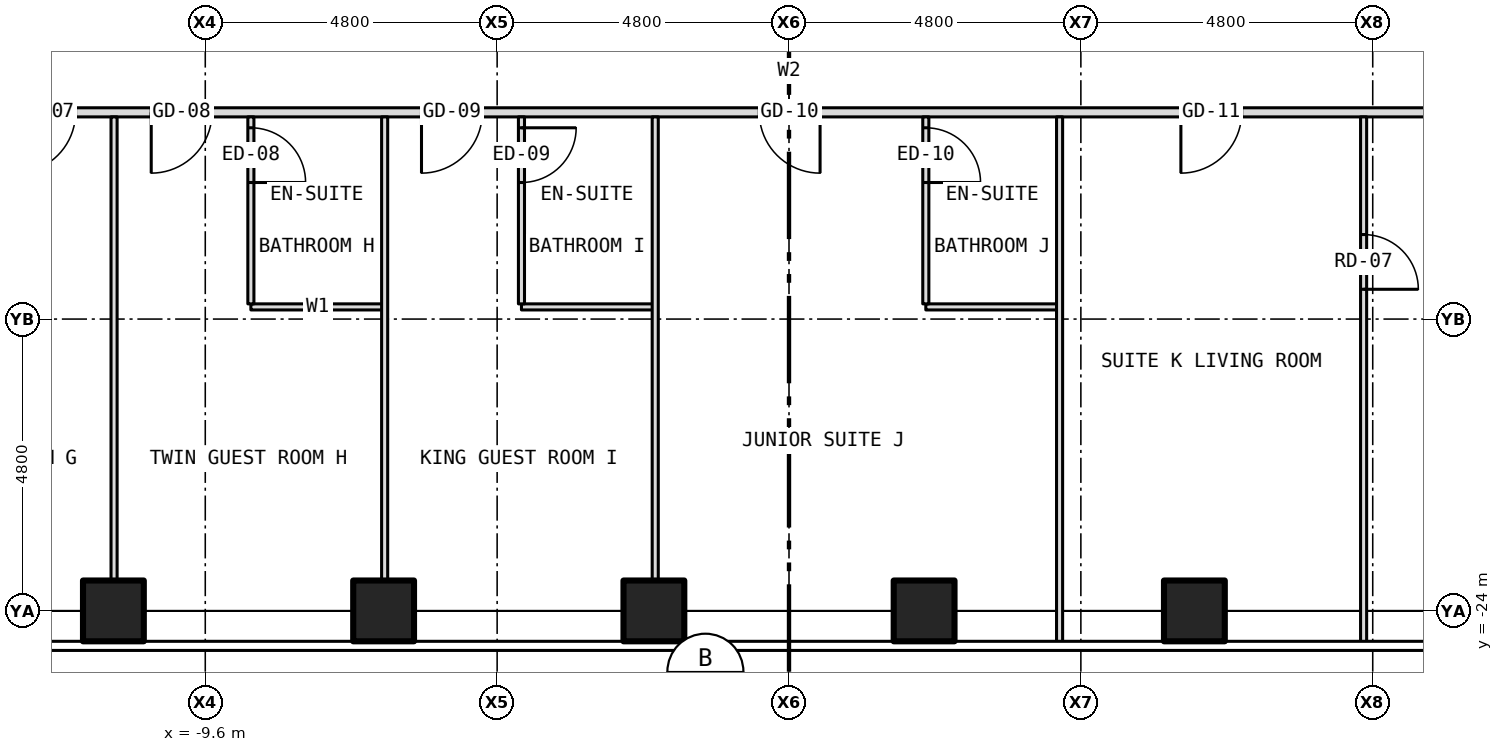
"""IFC4 building model, lengths in metres.
Left out: names, types, materials, properties, quantities, classifications, styles, units other than length and angle.
Written with IfcOpenShell. Run it as: python <this file> out.ifc"""

import sys

from ifc_helpers import new_model, si_unit, direction, frame, frame_2d, origin, origin_2d, place, context, subcontext, project, spatial, rectangle, hollow_rectangle, extrude, element, fill, save


model = new_model("IFC4")
c1 = context("Model", 3, precision=1e-05, world=origin(), true_north=direction((0.0, 1.0)))
c2 = subcontext(c1, "Body", "Model", "MODEL_VIEW")
j1 = project(units=[si_unit("LENGTHUNIT", "METRE"), si_unit("PLANEANGLEUNIT", "RADIAN")], contexts=[c1])
p1 = place(None, origin())
s1 = spatial("IfcSite", under=j1, at=p1, CompositionType="ELEMENT")
p2 = place(p1, origin())
s2 = spatial("IfcBuilding", under=s1, at=p2, CompositionType="ELEMENT")
p3 = place(p2, frame((0.0, 0.0, 56.5)))
s3 = spatial("IfcBuildingStorey", under=s2, at=p3, CompositionType="ELEMENT", Elevation=56.5)
for number, where, z_axis, x_axis in (
    (1, (-11.111, -24.0, -0.15), (0.0, 0.0, 1.0), (1.0, 0.0, 0.0)),
    (2, (-6.667, -24.0, -0.15), (0.0, 0.0, 1.0), (1.0, 0.0, 0.0)),
    (3, (-2.222, -24.0, -0.15), (0.0, 0.0, 1.0), (1.0, 0.0, 0.0)),
    (4, (2.222, -24.0, -0.15), (0.0, 0.0, 1.0), (1.0, 0.0, 0.0)),
    (5, (6.667, -24.0, -0.15), (0.0, 0.0, 1.0), (1.0, 0.0, 0.0)),
):
    element("IfcColumn", number, at=place(p3, frame(where, z_axis=z_axis, x_axis=x_axis)), inside=s3, PredefinedType="COLUMN", context=c2, shape_type="SweptSolid", body=[
        extrude(hollow_rectangle(XDim=1.0, YDim=1.0, WallThickness=0.06, at=origin_2d()), origin(), (0.0, 0.0, 1.0), 3.5),
    ])
p4 = place(p3, frame((-8.85, -19.0, 0.0), z_axis=(0.0, 0.0, 1.0), x_axis=(1.0, 0.0, 0.0)))
e6 = element("IfcWall", 6, at=p4, inside=s3, PredefinedType="PARTITIONING", context=c2, shape_type="SweptSolid", body=[
    extrude(rectangle(XDim=2.2, YDim=0.1, at=frame_2d((1.1, 0.0))), origin(), (0.0, 0.0, 1.0), 3.35),
])
for number, where, z_axis, x_axis in (
    (7, (-4.4, -19.0, 0.0), (0.0, 0.0, 1.0), (1.0, 0.0, 0.0)),
    (8, (2.25, -19.0, 0.0), (0.0, 0.0, 1.0), (1.0, 0.0, 0.0)),
):
    element("IfcWall", number, at=place(p3, frame(where, z_axis=z_axis, x_axis=x_axis)), inside=s3, PredefinedType="PARTITIONING", context=c2, shape_type="SweptSolid", body=[
        extrude(rectangle(XDim=2.2, YDim=0.1, at=frame_2d((1.1, 0.0))), origin(), (0.0, 0.0, 1.0), 3.35),
    ])
p5 = place(p3, frame((-15.8, -15.8, 0.0), z_axis=(0.0, 0.0, 1.0), x_axis=(1.0, 0.0, 0.0)))
e9 = element("IfcWall", 9, at=p5, inside=s3, PredefinedType="PARTITIONING", context=c2, shape_type="SweptSolid", body=[
    extrude(rectangle(XDim=31.6, YDim=0.15, at=frame_2d((15.8, 0.0))), origin(), (0.0, 0.0, 1.0), 3.35),
])
p6 = place(p5, frame((3.067, 0.0, 0.0)))
e10 = element("IfcOpeningElement", 10, at=p6, cuts=e9, PredefinedType="OPENING", context=c2, shape_type="SweptSolid", body=[
    extrude(rectangle(XDim=1.0, YDim=2.1, at=frame_2d((0.5, 1.05))), frame((0.0, 0.087, 0.0), z_axis=(0.0, -1.0, 0.0), x_axis=(1.0, 0.0, 0.0)), (0.0, 0.0, 1.0), 0.174),
])
p7 = place(p5, frame((5.311, 0.0, 0.0)))
e11 = element("IfcOpeningElement", 11, at=p7, cuts=e9, PredefinedType="OPENING", context=c2, shape_type="SweptSolid", body=[
    extrude(rectangle(XDim=1.0, YDim=2.1, at=frame_2d((0.5, 1.05))), frame((0.0, 0.087, 0.0), z_axis=(0.0, -1.0, 0.0), x_axis=(1.0, 0.0, 0.0)), (0.0, 0.0, 1.0), 0.174),
])
p8 = place(p5, frame((9.756, 0.0, 0.0)))
e12 = element("IfcOpeningElement", 12, at=p8, cuts=e9, PredefinedType="OPENING", context=c2, shape_type="SweptSolid", body=[
    extrude(rectangle(XDim=1.0, YDim=2.1, at=frame_2d((0.5, 1.05))), frame((0.0, 0.087, 0.0), z_axis=(0.0, -1.0, 0.0), x_axis=(1.0, 0.0, 0.0)), (0.0, 0.0, 1.0), 0.174),
])
p9 = place(p5, frame((15.311, 0.0, 0.0)))
e13 = element("IfcOpeningElement", 13, at=p9, cuts=e9, PredefinedType="OPENING", context=c2, shape_type="SweptSolid", body=[
    extrude(rectangle(XDim=1.0, YDim=2.1, at=frame_2d((0.5, 1.05))), frame((0.0, 0.087, 0.0), z_axis=(0.0, -1.0, 0.0), x_axis=(1.0, 0.0, 0.0)), (0.0, 0.0, 1.0), 0.174),
])
p10 = place(p5, frame((22.245, 0.0, 0.0)))
e14 = element("IfcOpeningElement", 14, at=p10, cuts=e9, PredefinedType="OPENING", context=c2, shape_type="SweptSolid", body=[
    extrude(rectangle(XDim=1.0, YDim=2.1, at=frame_2d((0.5, 1.05))), frame((0.0, 0.087, 0.0), z_axis=(0.0, -1.0, 0.0), x_axis=(1.0, 0.0, 0.0)), (0.0, 0.0, 1.0), 0.174),
])
p11 = place(p3, frame((-11.1, -23.88, 0.0), z_axis=(0.0, 0.0, 1.0), x_axis=(0.0, 1.0, 0.0)))
e15 = element("IfcWall", 15, at=p11, inside=s3, PredefinedType="PARTITIONING", context=c2, shape_type="SweptSolid", body=[
    extrude(rectangle(XDim=8.005, YDim=0.1, at=frame_2d((4.002, 0.0))), origin(), (0.0, 0.0, 1.0), 3.35),
])
p12 = place(p3, frame((-8.85, -18.95, 0.0), z_axis=(0.0, 0.0, 1.0), x_axis=(0.0, 1.0, 0.0)))
e16 = element("IfcWall", 16, at=p12, inside=s3, PredefinedType="PARTITIONING", context=c2, shape_type="SweptSolid", body=[
    extrude(rectangle(XDim=3.075, YDim=0.1, at=frame_2d((1.538, 0.0))), origin(), (0.0, 0.0, 1.0), 3.35),
])
p13 = place(p12, frame((1.996, 0.0, 0.0)))
e17 = element("IfcOpeningElement", 17, at=p13, cuts=e16, PredefinedType="OPENING", context=c2, shape_type="SweptSolid", body=[
    extrude(rectangle(XDim=0.9, YDim=2.1, at=frame_2d((0.45, 1.05))), frame((0.0, 0.062, 0.0), z_axis=(0.0, -1.0, 0.0), x_axis=(1.0, 0.0, 0.0)), (0.0, 0.0, 1.0), 0.124),
])
p14 = place(p3, frame((-6.65, -23.88, 0.0), z_axis=(0.0, 0.0, 1.0), x_axis=(0.0, 1.0, 0.0)))
e18 = element("IfcWall", 18, at=p14, inside=s3, PredefinedType="PARTITIONING", context=c2, shape_type="SweptSolid", body=[
    extrude(rectangle(XDim=8.005, YDim=0.1, at=frame_2d((4.002, 0.0))), origin(), (0.0, 0.0, 1.0), 3.35),
])
p15 = place(p3, frame((-4.4, -18.95, 0.0), z_axis=(0.0, 0.0, 1.0), x_axis=(0.0, 1.0, 0.0)))
e19 = element("IfcWall", 19, at=p15, inside=s3, PredefinedType="PARTITIONING", context=c2, shape_type="SweptSolid", body=[
    extrude(rectangle(XDim=3.075, YDim=0.1, at=frame_2d((1.538, 0.0))), origin(), (0.0, 0.0, 1.0), 3.35),
])
p16 = place(p15, frame((1.996, 0.0, 0.0)))
e20 = element("IfcOpeningElement", 20, at=p16, cuts=e19, PredefinedType="OPENING", context=c2, shape_type="SweptSolid", body=[
    extrude(rectangle(XDim=0.9, YDim=2.1, at=frame_2d((0.45, 1.05))), frame((0.0, 0.062, 0.0), z_axis=(0.0, -1.0, 0.0), x_axis=(1.0, 0.0, 0.0)), (0.0, 0.0, 1.0), 0.124),
])
p17 = place(p3, frame((-2.2, -23.88, 0.0), z_axis=(0.0, 0.0, 1.0), x_axis=(0.0, 1.0, 0.0)))
e21 = element("IfcWall", 21, at=p17, inside=s3, PredefinedType="PARTITIONING", context=c2, shape_type="SweptSolid", body=[
    extrude(rectangle(XDim=8.005, YDim=0.1, at=frame_2d((4.002, 0.0))), origin(), (0.0, 0.0, 1.0), 3.35),
])
p18 = place(p3, frame((2.25, -18.95, 0.0), z_axis=(0.0, 0.0, 1.0), x_axis=(0.0, 1.0, 0.0)))
e22 = element("IfcWall", 22, at=p18, inside=s3, PredefinedType="PARTITIONING", context=c2, shape_type="SweptSolid", body=[
    extrude(rectangle(XDim=3.075, YDim=0.1, at=frame_2d((1.538, 0.0))), origin(), (0.0, 0.0, 1.0), 3.35),
])
p19 = place(p18, frame((1.996, 0.0, 0.0)))
e23 = element("IfcOpeningElement", 23, at=p19, cuts=e22, PredefinedType="OPENING", context=c2, shape_type="SweptSolid", body=[
    extrude(rectangle(XDim=0.9, YDim=2.1, at=frame_2d((0.45, 1.05))), frame((0.0, 0.062, 0.0), z_axis=(0.0, -1.0, 0.0), x_axis=(1.0, 0.0, 0.0)), (0.0, 0.0, 1.0), 0.124),
])
p20 = place(p3, frame((4.45, -24.53, 0.0), z_axis=(0.0, 0.0, 1.0), x_axis=(0.0, 1.0, 0.0)))
e24 = element("IfcWall", 24, at=p20, inside=s3, PredefinedType="PARTITIONING", context=c2, shape_type="SweptSolid", body=[
    extrude(rectangle(XDim=8.655, YDim=0.1, at=frame_2d((4.328, 0.0))), origin(), (0.0, 0.0, 1.0), 3.35),
])
p21 = place(p3, frame((9.45, -24.53, 0.0), z_axis=(0.0, 0.0, 1.0), x_axis=(0.0, 1.0, 0.0)))
e25 = element("IfcWall", 25, at=p21, inside=s3, PredefinedType="PARTITIONING", context=c2, shape_type="SweptSolid", body=[
    extrude(rectangle(XDim=8.655, YDim=0.1, at=frame_2d((4.328, 0.0))), origin(), (0.0, 0.0, 1.0), 2.728),
])
p22 = place(p21, frame((5.82, 0.0, 0.0)))
e26 = element("IfcOpeningElement", 26, at=p22, cuts=e25, PredefinedType="OPENING", context=c2, shape_type="SweptSolid", body=[
    extrude(rectangle(XDim=0.9, YDim=2.1, at=frame_2d((0.45, 1.05))), frame((0.0, 0.062, 0.0), z_axis=(0.0, -1.0, 0.0), x_axis=(1.0, 0.0, 0.0)), (0.0, 0.0, 1.0), 0.124),
])
p23 = place(p6, origin())
e27 = element("IfcDoor", 27, at=p23, inside=s3, OperationType="SINGLE_SWING_LEFT", PredefinedType="DOOR", context=c2, shape_type="SweptSolid", body=[
    extrude(rectangle(XDim=1.0, YDim=2.1, at=frame_2d((0.5, 1.05))), frame((0.0, 0.025, 0.0), z_axis=(0.0, -1.0, 0.0), x_axis=(1.0, 0.0, 0.0)), (0.0, 0.0, 1.0), 0.05),
])
fill(e10, e27)
p24 = place(p7, origin())
e28 = element("IfcDoor", 28, at=p24, inside=s3, OperationType="SINGLE_SWING_LEFT", PredefinedType="DOOR", context=c2, shape_type="SweptSolid", body=[
    extrude(rectangle(XDim=1.0, YDim=2.1, at=frame_2d((0.5, 1.05))), frame((0.0, 0.025, 0.0), z_axis=(0.0, -1.0, 0.0), x_axis=(1.0, 0.0, 0.0)), (0.0, 0.0, 1.0), 0.05),
])
fill(e11, e28)
p25 = place(p13, origin())
e29 = element("IfcDoor", 29, at=p25, inside=s3, OperationType="SINGLE_SWING_LEFT", PredefinedType="DOOR", context=c2, shape_type="SweptSolid", body=[
    extrude(rectangle(XDim=0.9, YDim=2.1, at=frame_2d((0.45, 1.05))), frame((0.0, 0.025, 0.0), z_axis=(0.0, -1.0, 0.0), x_axis=(1.0, 0.0, 0.0)), (0.0, 0.0, 1.0), 0.05),
])
fill(e17, e29)
p26 = place(p8, origin())
e30 = element("IfcDoor", 30, at=p26, inside=s3, OperationType="SINGLE_SWING_LEFT", PredefinedType="DOOR", context=c2, shape_type="SweptSolid", body=[
    extrude(rectangle(XDim=1.0, YDim=2.1, at=frame_2d((0.5, 1.05))), frame((0.0, 0.025, 0.0), z_axis=(0.0, -1.0, 0.0), x_axis=(1.0, 0.0, 0.0)), (0.0, 0.0, 1.0), 0.05),
])
fill(e12, e30)
p27 = place(p16, origin())
e31 = element("IfcDoor", 31, at=p27, inside=s3, OperationType="SINGLE_SWING_RIGHT", PredefinedType="DOOR", context=c2, shape_type="SweptSolid", body=[
    extrude(rectangle(XDim=0.9, YDim=2.1, at=frame_2d((0.45, 1.05))), frame((0.0, 0.025, 0.0), z_axis=(0.0, -1.0, 0.0), x_axis=(1.0, 0.0, 0.0)), (0.0, 0.0, 1.0), 0.05),
])
fill(e20, e31)
p28 = place(p9, origin())
e32 = element("IfcDoor", 32, at=p28, inside=s3, OperationType="SINGLE_SWING_RIGHT", PredefinedType="DOOR", context=c2, shape_type="SweptSolid", body=[
    extrude(rectangle(XDim=1.0, YDim=2.1, at=frame_2d((0.5, 1.05))), frame((0.0, 0.025, 0.0), z_axis=(0.0, -1.0, 0.0), x_axis=(1.0, 0.0, 0.0)), (0.0, 0.0, 1.0), 0.05),
])
fill(e13, e32)
p29 = place(p19, origin())
e33 = element("IfcDoor", 33, at=p29, inside=s3, OperationType="SINGLE_SWING_LEFT", PredefinedType="DOOR", context=c2, shape_type="SweptSolid", body=[
    extrude(rectangle(XDim=0.9, YDim=2.1, at=frame_2d((0.45, 1.05))), frame((0.0, 0.025, 0.0), z_axis=(0.0, -1.0, 0.0), x_axis=(1.0, 0.0, 0.0)), (0.0, 0.0, 1.0), 0.05),
])
fill(e23, e33)
p30 = place(p10, origin())
e34 = element("IfcDoor", 34, at=p30, inside=s3, OperationType="SINGLE_SWING_LEFT", PredefinedType="DOOR", context=c2, shape_type="SweptSolid", body=[
    extrude(rectangle(XDim=1.0, YDim=2.1, at=frame_2d((0.5, 1.05))), frame((0.0, 0.025, 0.0), z_axis=(0.0, -1.0, 0.0), x_axis=(1.0, 0.0, 0.0)), (0.0, 0.0, 1.0), 0.05),
])
fill(e14, e34)
p31 = place(p22, origin())
e35 = element("IfcDoor", 35, at=p31, inside=s3, OperationType="SINGLE_SWING_LEFT", PredefinedType="DOOR", context=c2, shape_type="SweptSolid", body=[
    extrude(rectangle(XDim=0.9, YDim=2.1, at=frame_2d((0.45, 1.05))), frame((0.0, 0.025, 0.0), z_axis=(0.0, -1.0, 0.0), x_axis=(1.0, 0.0, 0.0)), (0.0, 0.0, 1.0), 0.05),
])
fill(e26, e35)
save(model, sys.argv[1])
